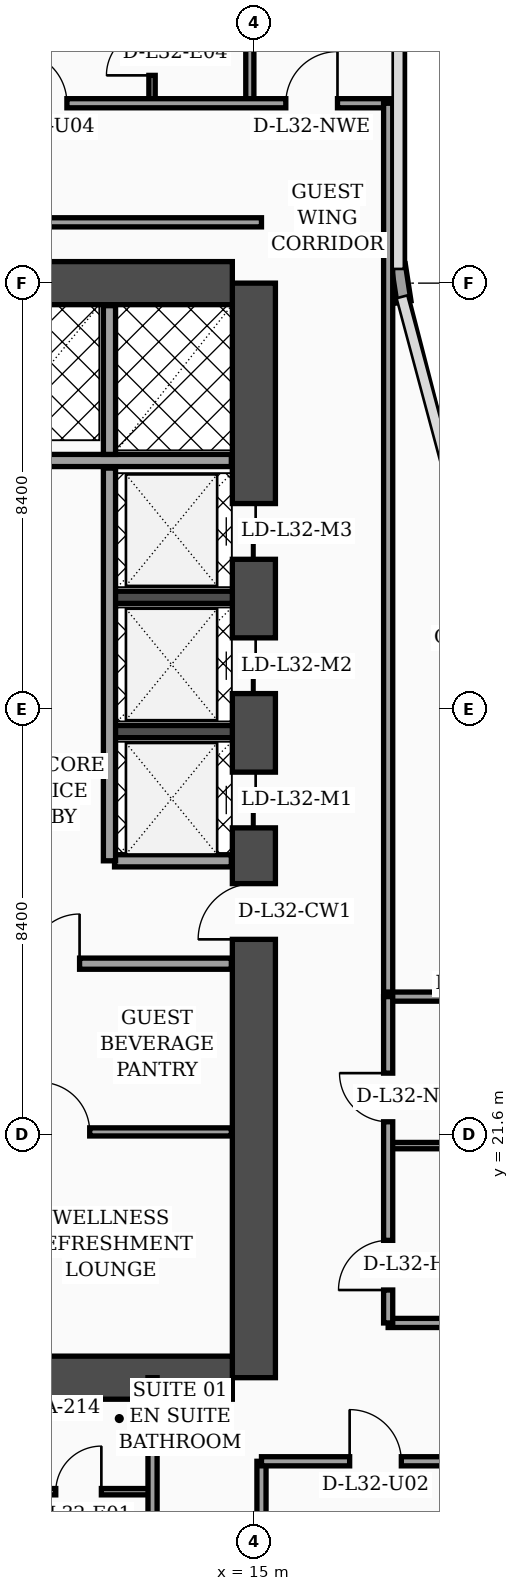
"""IFC4 building model, lengths in metres.
Left out: names, types, materials, properties, quantities, classifications, styles, units other than length and angle.
Written with IfcOpenShell. Run it as: python <this file> out.ifc"""

import sys

from ifc_helpers import new_model, si_unit, direction, frame, frame_2d, origin, place, context, subcontext, project, spatial, rectangle, extrude, element, fill, save


model = new_model("IFC4")
c1 = context("Model", 3, precision=1e-05, world=origin(), true_north=direction((0.0, 1.0)))
c2 = subcontext(c1, "Body", "Model", "MODEL_VIEW")
j1 = project(units=[si_unit("LENGTHUNIT", "METRE"), si_unit("PLANEANGLEUNIT", "RADIAN")], contexts=[c1])
p1 = place(None, origin())
s1 = spatial("IfcSite", under=j1, at=p1, CompositionType="ELEMENT")
p2 = place(p1, origin())
s2 = spatial("IfcBuilding", under=s1, at=p2, CompositionType="ELEMENT")
p3 = place(p2, frame((0.0, 0.0, 131.6)))
s3 = spatial("IfcBuildingStorey", under=s2, at=p3, CompositionType="ELEMENT", Elevation=131.6)
p4 = place(p3, frame((15.0, 16.8, 0.0), z_axis=(0.0, 0.0, 1.0), x_axis=(0.0, 1.0, 0.0)))
e1 = element("IfcWall", 1, at=p4, inside=s3, PredefinedType="SHEAR", context=c2, shape_type="SweptSolid", body=[
    extrude(rectangle(XDim=21.6, YDim=0.85, at=frame_2d((10.8, 0.0))), origin(), (0.0, 0.0, 1.0), 3.56),
])
p5 = place(p4, frame((8.65, 0.0, 0.0)))
e2 = element("IfcOpeningElement", 2, at=p5, cuts=e1, PredefinedType="OPENING", context=c2, shape_type="SweptSolid", body=[
    extrude(rectangle(XDim=1.1, YDim=2.2, at=frame_2d((0.55, 1.1))), frame((0.0, 0.435, 0.0), z_axis=(0.0, -1.0, 0.0), x_axis=(1.0, 0.0, 0.0)), (0.0, 0.0, 1.0), 0.87),
])
p6 = place(p4, frame((10.85, 0.0, 0.0)))
e3 = element("IfcOpeningElement", 3, at=p6, cuts=e1, PredefinedType="OPENING", context=c2, shape_type="SweptSolid", body=[
    extrude(rectangle(XDim=1.1, YDim=2.2, at=frame_2d((0.55, 1.1))), frame((0.0, 0.435, 0.0), z_axis=(0.0, -1.0, 0.0), x_axis=(1.0, 0.0, 0.0)), (0.0, 0.0, 1.0), 0.87),
])
p7 = place(p4, frame((13.5, 0.0, 0.0)))
e4 = element("IfcOpeningElement", 4, at=p7, cuts=e1, PredefinedType="OPENING", context=c2, shape_type="SweptSolid", body=[
    extrude(rectangle(XDim=1.1, YDim=2.2, at=frame_2d((0.55, 1.1))), frame((0.0, 0.435, 0.0), z_axis=(0.0, -1.0, 0.0), x_axis=(1.0, 0.0, 0.0)), (0.0, 0.0, 1.0), 0.87),
])
p8 = place(p4, frame((16.15, 0.0, 0.0)))
e5 = element("IfcOpeningElement", 5, at=p8, cuts=e1, PredefinedType="OPENING", context=c2, shape_type="SweptSolid", body=[
    extrude(rectangle(XDim=1.1, YDim=2.2, at=frame_2d((0.55, 1.1))), frame((0.0, 0.435, 0.0), z_axis=(0.0, -1.0, 0.0), x_axis=(1.0, 0.0, 0.0)), (0.0, 0.0, 1.0), 0.87),
])
for number, where, z_axis, x_axis in (
    (6, (4.625, 38.4, 0.0), (0.0, 0.0, 1.0), (1.0, 0.0, 0.0)),
    (7, (4.625, 16.8, 0.0), (0.0, 0.0, 1.0), (1.0, 0.0, 0.0)),
):
    element("IfcWall", number, at=place(p3, frame(where, z_axis=z_axis, x_axis=x_axis)), inside=s3, PredefinedType="SHEAR", context=c2, shape_type="SweptSolid", body=[
        extrude(rectangle(XDim=9.95, YDim=0.85, at=frame_2d((4.975, 0.0))), origin(), (0.0, 0.0, 1.0), 3.56),
    ])
for number, where, z_axis, x_axis in (
    (8, (12.18, 29.55, 0.0), (0.0, 0.0, 1.0), (1.0, 0.0, 0.0)),
    (9, (12.18, 32.2, 0.0), (0.0, 0.0, 1.0), (1.0, 0.0, 0.0)),
):
    element("IfcWall", number, at=place(p3, frame(where, z_axis=z_axis, x_axis=x_axis)), inside=s3, PredefinedType="SOLIDWALL", context=c2, shape_type="SweptSolid", body=[
        extrude(rectangle(XDim=2.395, YDim=0.24, at=frame_2d((1.198, 0.0))), origin(), (0.0, 0.0, 1.0), 3.56),
    ])
p9 = place(p3, frame((17.962, 38.03, 0.0), z_axis=(0.0, 0.0, 1.0), x_axis=(-0.15141125477, 0.988470855377, 0.0)))
e10 = element("IfcWall", 10, at=p9, inside=s3, PredefinedType="SOLIDWALL", context=c2, shape_type="SweptSolid", body=[
    extrude(rectangle(XDim=0.739, YDim=0.28, at=frame_2d((0.369, 0.0))), origin(), (0.0, 0.0, 1.0), 3.56),
])
p10 = place(p3, frame((9.68, 21.65, 0.0), z_axis=(0.0, 0.0, 1.0), x_axis=(1.0, 0.0, 0.0)))
e11 = element("IfcWall", 11, at=p10, inside=s3, PredefinedType="PARTITIONING", context=c2, shape_type="SweptSolid", body=[
    extrude(rectangle(XDim=4.875, YDim=0.16, at=frame_2d((2.438, 0.0))), origin(), (0.0, 0.0, 1.0), 3.09),
])
p11 = place(p10, frame((1.1, 0.0, 0.0)))
e12 = element("IfcOpeningElement", 12, at=p11, cuts=e11, PredefinedType="OPENING", context=c2, shape_type="SweptSolid", body=[
    extrude(rectangle(XDim=0.98, YDim=2.15, at=frame_2d((0.49, 1.075))), frame((0.0, 0.09, 0.0), z_axis=(0.0, -1.0, 0.0), x_axis=(1.0, 0.0, 0.0)), (0.0, 0.0, 1.0), 0.18),
])
p12 = place(p3, frame((9.68, 24.97, 0.0), z_axis=(0.0, 0.0, 1.0), x_axis=(1.0, 0.0, 0.0)))
e13 = element("IfcWall", 13, at=p12, inside=s3, PredefinedType="SOLIDWALL", context=c2, shape_type="SweptSolid", body=[
    extrude(rectangle(XDim=4.875, YDim=0.22, at=frame_2d((2.438, 0.0))), origin(), (0.0, 0.0, 1.0), 2.84),
])
p13 = place(p12, frame((0.9, 0.0, 0.0)))
e14 = element("IfcOpeningElement", 14, at=p13, cuts=e13, PredefinedType="OPENING", context=c2, shape_type="SweptSolid", body=[
    extrude(rectangle(XDim=0.98, YDim=2.15, at=frame_2d((0.49, 1.075))), frame((0.0, 0.12, 0.0), z_axis=(0.0, -1.0, 0.0), x_axis=(1.0, 0.0, 0.0)), (0.0, 0.0, 1.0), 0.24),
])
p14 = place(p3, frame((12.25, 27.0, 0.0), z_axis=(0.0, 0.0, 1.0), x_axis=(1.0, 0.0, 0.0)))
e15 = element("IfcWall", 15, at=p14, inside=s3, PredefinedType="SOLIDWALL", context=c2, shape_type="SweptSolid", body=[
    extrude(rectangle(XDim=2.305, YDim=0.24, at=frame_2d((1.152, 0.0))), origin(), (0.0, 0.0, 1.0), 3.56),
])
p15 = place(p3, frame((12.15, 27.0, 0.0), z_axis=(0.0, 0.0, 1.0), x_axis=(0.0, 1.0, 0.0)))
e16 = element("IfcWall", 16, at=p15, inside=s3, PredefinedType="SOLIDWALL", context=c2, shape_type="SweptSolid", body=[
    extrude(rectangle(XDim=7.75, YDim=0.24, at=frame_2d((3.875, 0.0))), origin(), (0.0, 0.0, 1.0), 3.56),
])
p16 = place(p3, frame((9.66, 34.9, 0.0), z_axis=(0.0, 0.0, 1.0), x_axis=(1.0, 0.0, 0.0)))
e17 = element("IfcWall", 17, at=p16, inside=s3, PredefinedType="SOLIDWALL", context=c2, shape_type="SweptSolid", body=[
    extrude(rectangle(XDim=4.895, YDim=0.24, at=frame_2d((2.448, 0.0))), origin(), (0.0, 0.0, 1.0), 3.56),
])
p17 = place(p3, frame((12.15, 35.02, 0.0), z_axis=(0.0, 0.0, 1.0), x_axis=(0.0, 1.0, 0.0)))
e18 = element("IfcWall", 18, at=p17, inside=s3, PredefinedType="SOLIDWALL", context=c2, shape_type="SweptSolid", body=[
    extrude(rectangle(XDim=2.935, YDim=0.24, at=frame_2d((1.468, 0.0))), origin(), (0.0, 0.0, 1.0), 3.56),
])
p18 = place(p3, frame((3.2, 14.55, 0.0), z_axis=(0.0, 0.0, 1.0), x_axis=(1.0, 0.0, 0.0)))
e19 = element("IfcWall", 19, at=p18, inside=s3, PredefinedType="PARTITIONING", context=c2, shape_type="SweptSolid", body=[
    extrude(rectangle(XDim=9.8, YDim=0.125, at=frame_2d((4.9, 0.0))), origin(), (0.0, 0.0, 1.0), 2.84),
])
p19 = place(p18, frame((3.32, 0.0, 0.0)))
e20 = element("IfcOpeningElement", 20, at=p19, cuts=e19, PredefinedType="OPENING", context=c2, shape_type="SweptSolid", body=[
    extrude(rectangle(XDim=0.96, YDim=2.2, at=frame_2d((0.48, 1.1))), frame((0.0, 0.073, 0.0), z_axis=(0.0, -1.0, 0.0), x_axis=(1.0, 0.0, 0.0)), (0.0, 0.0, 1.0), 0.145),
])
p20 = place(p18, frame((7.89, 0.0, 0.0)))
e21 = element("IfcOpeningElement", 21, at=p20, cuts=e19, PredefinedType="OPENING", context=c2, shape_type="SweptSolid", body=[
    extrude(rectangle(XDim=0.9, YDim=2.15, at=frame_2d((0.45, 1.075))), frame((0.0, 0.073, 0.0), z_axis=(0.0, -1.0, 0.0), x_axis=(1.0, 0.0, 0.0)), (0.0, 0.0, 1.0), 0.145),
])
p21 = place(p3, frame((13.0, 2.44, 0.0), z_axis=(0.0, 0.0, 1.0), x_axis=(0.0, 1.0, 0.0)))
e22 = element("IfcWall", 22, at=p21, inside=s3, PredefinedType="PARTITIONING", context=c2, shape_type="SweptSolid", body=[
    extrude(rectangle(XDim=14.36, YDim=0.18, at=frame_2d((7.18, 0.0))), origin(), (0.0, 0.0, 1.0), 2.84),
])
p22 = place(p21, frame((3.01, 0.0, 0.0)))
e23 = element("IfcOpeningElement", 23, at=p22, cuts=e22, PredefinedType="OPENING", context=c2, shape_type="SweptSolid", body=[
    extrude(rectangle(XDim=1.02, YDim=2.2, at=frame_2d((0.51, 1.1))), frame((0.0, 0.1, 0.0), z_axis=(0.0, -1.0, 0.0), x_axis=(1.0, 0.0, 0.0)), (0.0, 0.0, 1.0), 0.2),
])
p23 = place(p3, frame((15.15, 2.44, 0.0), z_axis=(0.0, 0.0, 1.0), x_axis=(0.0, 1.0, 0.0)))
e24 = element("IfcWall", 24, at=p23, inside=s3, PredefinedType="PARTITIONING", context=c2, shape_type="SweptSolid", body=[
    extrude(rectangle(XDim=12.71, YDim=0.18, at=frame_2d((6.355, 0.0))), origin(), (0.0, 0.0, 1.0), 3.04),
])
p24 = place(p3, frame((15.15, 15.15, 0.0), z_axis=(0.0, 0.0, 1.0), x_axis=(1.0, 0.0, 0.0)))
e25 = element("IfcWall", 25, at=p24, inside=s3, PredefinedType="PARTITIONING", context=c2, shape_type="SweptSolid", body=[
    extrude(rectangle(XDim=6.45, YDim=0.18, at=frame_2d((3.225, 0.0))), origin(), (0.0, 0.0, 1.0), 2.49),
])
p25 = place(p24, frame((1.74, 0.0, 0.0)))
e26 = element("IfcOpeningElement", 26, at=p25, cuts=e25, PredefinedType="OPENING", context=c2, shape_type="SweptSolid", body=[
    extrude(rectangle(XDim=1.02, YDim=2.2, at=frame_2d((0.51, 1.1))), frame((0.0, 0.1, 0.0), z_axis=(0.0, -1.0, 0.0), x_axis=(1.0, 0.0, 0.0)), (0.0, 0.0, 1.0), 0.2),
])
p26 = place(p3, frame((14.92, 41.95, 0.0), z_axis=(0.0, 0.0, 1.0), x_axis=(0.0, 1.0, 0.0)))
e27 = element("IfcWall", 27, at=p26, inside=s3, PredefinedType="PARTITIONING", context=c2, shape_type="SweptSolid", body=[
    extrude(rectangle(XDim=5.85, YDim=0.16, at=frame_2d((2.925, 0.0))), origin(), (0.0, 0.0, 1.0), 3.04),
])
p27 = place(p3, frame((12.99, 41.95, 0.0), z_axis=(0.0, 0.0, 1.0), x_axis=(0.0, 1.0, 0.0)))
e28 = element("IfcWall", 28, at=p27, inside=s3, PredefinedType="PARTITIONING", context=c2, shape_type="SweptSolid", body=[
    extrude(rectangle(XDim=8.99, YDim=0.125, at=frame_2d((4.495, 0.0))), origin(), (0.0, 0.0, 1.0), 3.04),
])
p28 = place(p27, frame((0.55, 0.0, 0.0)))
e29 = element("IfcOpeningElement", 29, at=p28, cuts=e28, PredefinedType="OPENING", context=c2, shape_type="SweptSolid", body=[
    extrude(rectangle(XDim=0.9, YDim=2.15, at=frame_2d((0.45, 1.075))), frame((0.0, 0.073, 0.0), z_axis=(0.0, -1.0, 0.0), x_axis=(1.0, 0.0, 0.0)), (0.0, 0.0, 1.0), 0.145),
])
p29 = place(p27, frame((4.88, 0.0, 0.0)))
e30 = element("IfcOpeningElement", 30, at=p29, cuts=e28, PredefinedType="OPENING", context=c2, shape_type="SweptSolid", body=[
    extrude(rectangle(XDim=0.96, YDim=2.2, at=frame_2d((0.48, 1.1))), frame((0.0, 0.073, 0.0), z_axis=(0.0, -1.0, 0.0), x_axis=(1.0, 0.0, 0.0)), (0.0, 0.0, 1.0), 0.145),
])
p30 = place(p3, frame((0.08, 41.95, 0.0), z_axis=(0.0, 0.0, 1.0), x_axis=(1.0, 0.0, 0.0)))
e31 = element("IfcWall", 31, at=p30, inside=s3, PredefinedType="PARTITIONING", context=c2, shape_type="SweptSolid", body=[
    extrude(rectangle(XDim=17.77, YDim=0.18, at=frame_2d((8.885, 0.0))), origin(), (0.0, 0.0, 1.0), 2.84),
])
p31 = place(p30, frame((0.9, 0.0, 0.0)))
e32 = element("IfcOpeningElement", 32, at=p31, cuts=e31, PredefinedType="OPENING", context=c2, shape_type="SweptSolid", body=[
    extrude(rectangle(XDim=1.02, YDim=2.2, at=frame_2d((0.51, 1.1))), frame((0.0, 0.1, 0.0), z_axis=(0.0, -1.0, 0.0), x_axis=(1.0, 0.0, 0.0)), (0.0, 0.0, 1.0), 0.2),
])
p32 = place(p30, frame((4.32, 0.0, 0.0)))
e33 = element("IfcOpeningElement", 33, at=p32, cuts=e31, PredefinedType="OPENING", context=c2, shape_type="SweptSolid", body=[
    extrude(rectangle(XDim=1.02, YDim=2.2, at=frame_2d((0.51, 1.1))), frame((0.0, 0.1, 0.0), z_axis=(0.0, -1.0, 0.0), x_axis=(1.0, 0.0, 0.0)), (0.0, 0.0, 1.0), 0.2),
])
p33 = place(p30, frame((10.21, 0.0, 0.0)))
e34 = element("IfcOpeningElement", 34, at=p33, cuts=e31, PredefinedType="OPENING", context=c2, shape_type="SweptSolid", body=[
    extrude(rectangle(XDim=1.02, YDim=2.2, at=frame_2d((0.51, 1.1))), frame((0.0, 0.1, 0.0), z_axis=(0.0, -1.0, 0.0), x_axis=(1.0, 0.0, 0.0)), (0.0, 0.0, 1.0), 0.2),
])
p34 = place(p30, frame((15.55, 0.0, 0.0)))
e35 = element("IfcOpeningElement", 35, at=p34, cuts=e31, PredefinedType="OPENING", context=c2, shape_type="SweptSolid", body=[
    extrude(rectangle(XDim=1.02, YDim=2.2, at=frame_2d((0.51, 1.1))), frame((0.0, 0.1, 0.0), z_axis=(0.0, -1.0, 0.0), x_axis=(1.0, 0.0, 0.0)), (0.0, 0.0, 1.0), 0.2),
])
p35 = place(p3, frame((17.65, 24.3, 0.0), z_axis=(0.0, 0.0, 1.0), x_axis=(0.0, 1.0, 0.0)))
e36 = element("IfcWall", 36, at=p35, inside=s3, PredefinedType="PARTITIONING", context=c2, shape_type="SweptSolid", body=[
    extrude(rectangle(XDim=17.65, YDim=0.18, at=frame_2d((8.825, 0.0))), origin(), (0.0, 0.0, 1.0), 2.84),
])
p36 = place(p3, frame((3.755, 39.6, 0.0), z_axis=(0.0, 0.0, 1.0), x_axis=(1.0, 0.0, 0.0)))
e37 = element("IfcWall", 37, at=p36, inside=s3, PredefinedType="PARTITIONING", context=c2, shape_type="SweptSolid", body=[
    extrude(rectangle(XDim=11.395, YDim=0.18, at=frame_2d((5.698, 0.0))), origin(), (0.0, 0.0, 1.0), 2.84),
])
p37 = place(p3, frame((17.65, 17.88, 0.0), z_axis=(0.0, 0.0, 1.0), x_axis=(1.0, 0.0, 0.0)))
e38 = element("IfcWall", 38, at=p37, inside=s3, PredefinedType="PARTITIONING", context=c2, shape_type="SweptSolid", body=[
    extrude(rectangle(XDim=3.9, YDim=0.18, at=frame_2d((1.95, 0.0))), origin(), (0.0, 0.0, 1.0), 3.56),
])
p38 = place(p3, frame((17.65, 21.38, 0.0), z_axis=(0.0, 0.0, 1.0), x_axis=(1.0, 0.0, 0.0)))
e39 = element("IfcWall", 39, at=p38, inside=s3, PredefinedType="PARTITIONING", context=c2, shape_type="SweptSolid", body=[
    extrude(rectangle(XDim=3.9, YDim=0.125, at=frame_2d((1.95, 0.0))), origin(), (0.0, 0.0, 1.0), 3.09),
])
p39 = place(p3, frame((17.65, 24.32, 0.0), z_axis=(0.0, 0.0, 1.0), x_axis=(1.0, 0.0, 0.0)))
e40 = element("IfcWall", 40, at=p39, inside=s3, PredefinedType="PARTITIONING", context=c2, shape_type="SweptSolid", body=[
    extrude(rectangle(XDim=3.95, YDim=0.18, at=frame_2d((1.975, 0.0))), origin(), (0.0, 0.0, 1.0), 3.56),
])
p40 = place(p3, frame((17.65, 17.88, 0.0), z_axis=(0.0, 0.0, 1.0), x_axis=(0.0, 1.0, 0.0)))
e41 = element("IfcWall", 41, at=p40, inside=s3, PredefinedType="PARTITIONING", context=c2, shape_type="SweptSolid", body=[
    extrude(rectangle(XDim=6.44, YDim=0.18, at=frame_2d((3.22, 0.0))), origin(), (0.0, 0.0, 1.0), 3.09),
])
p41 = place(p40, frame((0.65, 0.0, 0.0)))
e42 = element("IfcOpeningElement", 42, at=p41, cuts=e41, PredefinedType="OPENING", context=c2, shape_type="SweptSolid", body=[
    extrude(rectangle(XDim=0.98, YDim=2.15, at=frame_2d((0.49, 1.075))), frame((0.0, 0.1, 0.0), z_axis=(0.0, -1.0, 0.0), x_axis=(1.0, 0.0, 0.0)), (0.0, 0.0, 1.0), 0.2),
])
p42 = place(p40, frame((3.97, 0.0, 0.0)))
e43 = element("IfcOpeningElement", 43, at=p42, cuts=e41, PredefinedType="OPENING", context=c2, shape_type="SweptSolid", body=[
    extrude(rectangle(XDim=0.96, YDim=2.2, at=frame_2d((0.48, 1.1))), frame((0.0, 0.1, 0.0), z_axis=(0.0, -1.0, 0.0), x_axis=(1.0, 0.0, 0.0)), (0.0, 0.0, 1.0), 0.2),
])
p43 = place(p11, origin())
e44 = element("IfcDoor", 44, at=p43, inside=s3, OperationType="SINGLE_SWING_LEFT", PredefinedType="DOOR", context=c2, shape_type="SweptSolid", body=[
    extrude(rectangle(XDim=0.98, YDim=2.15, at=frame_2d((0.49, 1.075))), frame((0.0, 0.025, 0.0), z_axis=(0.0, -1.0, 0.0), x_axis=(1.0, 0.0, 0.0)), (0.0, 0.0, 1.0), 0.05),
])
fill(e12, e44)
p44 = place(p13, origin())
e45 = element("IfcDoor", 45, at=p44, inside=s3, OperationType="SINGLE_SWING_RIGHT", PredefinedType="DOOR", context=c2, shape_type="SweptSolid", body=[
    extrude(rectangle(XDim=0.98, YDim=2.15, at=frame_2d((0.49, 1.075))), frame((0.0, 0.025, 0.0), z_axis=(0.0, -1.0, 0.0), x_axis=(1.0, 0.0, 0.0)), (0.0, 0.0, 1.0), 0.05),
])
fill(e14, e45)
p45 = place(p20, origin())
e46 = element("IfcDoor", 46, at=p45, inside=s3, OperationType="SINGLE_SWING_RIGHT", PredefinedType="DOOR", context=c2, shape_type="SweptSolid", body=[
    extrude(rectangle(XDim=0.9, YDim=2.15, at=frame_2d((0.45, 1.075))), frame((0.0, 0.025, 0.0), z_axis=(0.0, -1.0, 0.0), x_axis=(1.0, 0.0, 0.0)), (0.0, 0.0, 1.0), 0.05),
])
fill(e21, e46)
p46 = place(p25, origin())
e47 = element("IfcDoor", 47, at=p46, inside=s3, OperationType="SINGLE_SWING_LEFT", PredefinedType="DOOR", context=c2, shape_type="SweptSolid", body=[
    extrude(rectangle(XDim=1.02, YDim=2.2, at=frame_2d((0.51, 1.1))), frame((0.0, 0.025, 0.0), z_axis=(0.0, -1.0, 0.0), x_axis=(1.0, 0.0, 0.0)), (0.0, 0.0, 1.0), 0.05),
])
fill(e26, e47)
p47 = place(p28, origin())
e48 = element("IfcDoor", 48, at=p47, inside=s3, OperationType="SINGLE_SWING_LEFT", PredefinedType="DOOR", context=c2, shape_type="SweptSolid", body=[
    extrude(rectangle(XDim=0.9, YDim=2.15, at=frame_2d((0.45, 1.075))), frame((0.0, 0.025, 0.0), z_axis=(0.0, -1.0, 0.0), x_axis=(1.0, 0.0, 0.0)), (0.0, 0.0, 1.0), 0.05),
])
fill(e29, e48)
p48 = place(p33, origin())
e49 = element("IfcDoor", 49, at=p48, inside=s3, OperationType="SINGLE_SWING_LEFT", PredefinedType="DOOR", context=c2, shape_type="SweptSolid", body=[
    extrude(rectangle(XDim=1.02, YDim=2.2, at=frame_2d((0.51, 1.1))), frame((0.0, 0.025, 0.0), z_axis=(0.0, -1.0, 0.0), x_axis=(1.0, 0.0, 0.0)), (0.0, 0.0, 1.0), 0.05),
])
fill(e34, e49)
p49 = place(p34, origin())
e50 = element("IfcDoor", 50, at=p49, inside=s3, OperationType="SINGLE_SWING_RIGHT", PredefinedType="DOOR", context=c2, shape_type="SweptSolid", body=[
    extrude(rectangle(XDim=1.02, YDim=2.2, at=frame_2d((0.51, 1.1))), frame((0.0, 0.025, 0.0), z_axis=(0.0, -1.0, 0.0), x_axis=(1.0, 0.0, 0.0)), (0.0, 0.0, 1.0), 0.05),
])
fill(e35, e50)
p50 = place(p41, origin())
e51 = element("IfcDoor", 51, at=p50, inside=s3, OperationType="SINGLE_SWING_LEFT", PredefinedType="DOOR", context=c2, shape_type="SweptSolid", body=[
    extrude(rectangle(XDim=0.98, YDim=2.15, at=frame_2d((0.49, 1.075))), frame((0.0, 0.025, 0.0), z_axis=(0.0, -1.0, 0.0), x_axis=(1.0, 0.0, 0.0)), (0.0, 0.0, 1.0), 0.05),
])
fill(e42, e51)
p51 = place(p42, origin())
e52 = element("IfcDoor", 52, at=p51, inside=s3, OperationType="SINGLE_SWING_RIGHT", PredefinedType="DOOR", context=c2, shape_type="SweptSolid", body=[
    extrude(rectangle(XDim=0.96, YDim=2.2, at=frame_2d((0.48, 1.1))), frame((0.0, 0.025, 0.0), z_axis=(0.0, -1.0, 0.0), x_axis=(1.0, 0.0, 0.0)), (0.0, 0.0, 1.0), 0.05),
])
fill(e43, e52)
p52 = place(p5, origin())
e53 = element("IfcDoor", 53, at=p52, inside=s3, OperationType="SINGLE_SWING_LEFT", PredefinedType="DOOR", context=c2, shape_type="SweptSolid", body=[
    extrude(rectangle(XDim=1.1, YDim=2.2, at=frame_2d((0.55, 1.1))), frame((0.0, 0.025, 0.0), z_axis=(0.0, -1.0, 0.0), x_axis=(1.0, 0.0, 0.0)), (0.0, 0.0, 1.0), 0.05),
])
fill(e2, e53)
p53 = place(p6, origin())
e54 = element("IfcDoor", 54, at=p53, inside=s3, OperationType="DOUBLE_DOOR_SLIDING", PredefinedType="DOOR", context=c2, shape_type="SweptSolid", body=[
    extrude(rectangle(XDim=1.1, YDim=2.2, at=frame_2d((0.55, 1.1))), frame((0.0, 0.025, 0.0), z_axis=(0.0, -1.0, 0.0), x_axis=(1.0, 0.0, 0.0)), (0.0, 0.0, 1.0), 0.05),
])
fill(e3, e54)
p54 = place(p7, origin())
e55 = element("IfcDoor", 55, at=p54, inside=s3, OperationType="DOUBLE_DOOR_SLIDING", PredefinedType="DOOR", context=c2, shape_type="SweptSolid", body=[
    extrude(rectangle(XDim=1.1, YDim=2.2, at=frame_2d((0.55, 1.1))), frame((0.0, 0.025, 0.0), z_axis=(0.0, -1.0, 0.0), x_axis=(1.0, 0.0, 0.0)), (0.0, 0.0, 1.0), 0.05),
])
fill(e4, e55)
p55 = place(p8, origin())
e56 = element("IfcDoor", 56, at=p55, inside=s3, OperationType="DOUBLE_DOOR_SLIDING", PredefinedType="DOOR", context=c2, shape_type="SweptSolid", body=[
    extrude(rectangle(XDim=1.1, YDim=2.2, at=frame_2d((0.55, 1.1))), frame((0.0, 0.025, 0.0), z_axis=(0.0, -1.0, 0.0), x_axis=(1.0, 0.0, 0.0)), (0.0, 0.0, 1.0), 0.05),
])
fill(e5, e56)
save(model, sys.argv[1])
